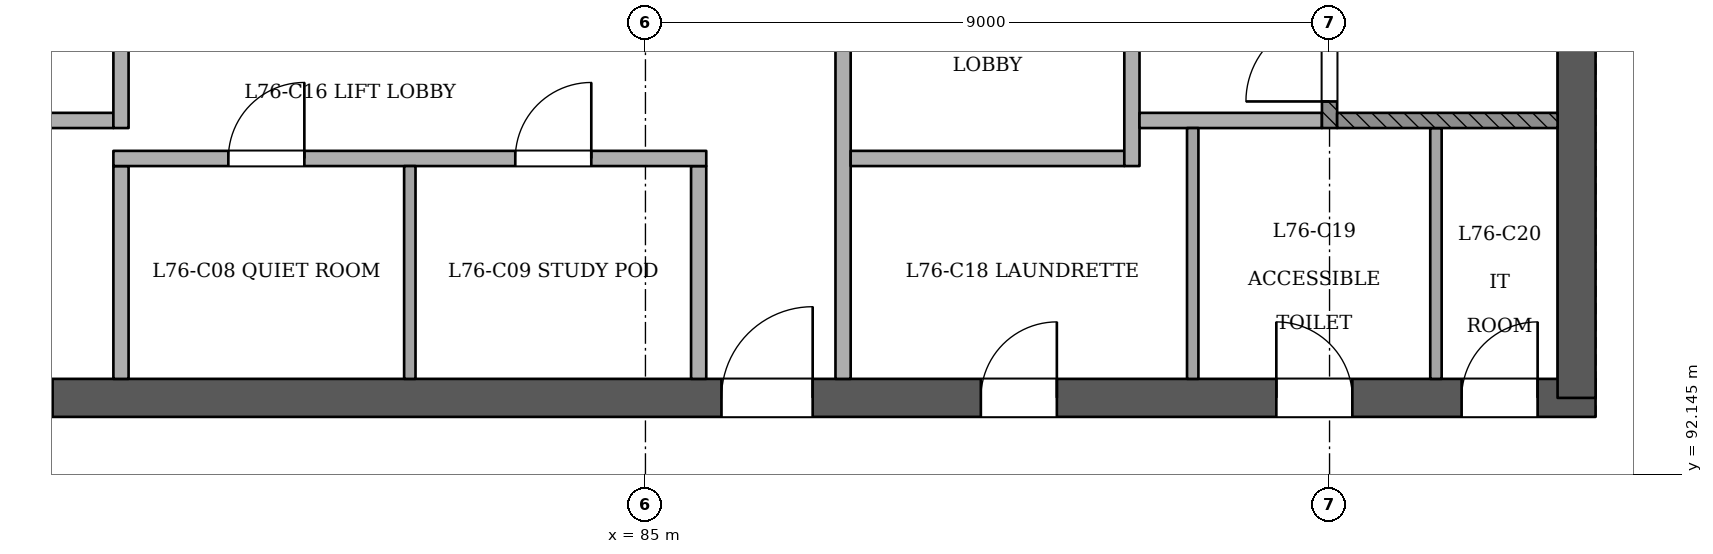
"""IFC4 building model, lengths in metres.
Left out: names, types, materials, properties, quantities, classifications, styles, units other than length and angle.
Written with IfcOpenShell. Run it as: python <this file> out.ifc"""

import sys

from ifc_helpers import new_model, si_unit, direction, frame, frame_2d, origin, place, context, subcontext, project, spatial, rectangle, extrude, element, fill, save


model = new_model("IFC4")
c1 = context("Model", 3, precision=1e-05, world=origin(), true_north=direction((0.0, 1.0)))
c2 = subcontext(c1, "Body", "Model", "MODEL_VIEW")
j1 = project(units=[si_unit("LENGTHUNIT", "METRE"), si_unit("PLANEANGLEUNIT", "RADIAN")], contexts=[c1])
p1 = place(None, origin())
s1 = spatial("IfcSite", under=j1, at=p1, CompositionType="ELEMENT")
p2 = place(p1, origin())
s2 = spatial("IfcBuilding", under=s1, at=p2, CompositionType="ELEMENT")
p3 = place(p2, frame((0.0, 0.0, 295.0)))
s3 = spatial("IfcBuildingStorey", under=s2, at=p3, CompositionType="ELEMENT", Elevation=295.0)
p4 = place(p3, frame((72.75, 93.15, 0.0), z_axis=(0.0, 0.0, 1.0), x_axis=(1.0, 0.0, 0.0)))
e1 = element("IfcWall", 1, at=p4, inside=s3, PredefinedType="SHEAR", context=c2, shape_type="SweptSolid", body=[
    extrude(rectangle(XDim=24.75, YDim=0.5, at=frame_2d((12.375, 0.0))), origin(), (0.0, 0.0, 1.0), 3.6),
])
p5 = place(p4, frame((1.05, 0.0, 0.0)))
e2 = element("IfcOpeningElement", 2, at=p5, cuts=e1, PredefinedType="OPENING", context=c2, shape_type="SweptSolid", body=[
    extrude(rectangle(XDim=1.2, YDim=2.1, at=frame_2d((0.6, 1.05))), frame((0.0, 0.26, 0.0), z_axis=(0.0, -1.0, 0.0), x_axis=(1.0, 0.0, 0.0)), (0.0, 0.0, 1.0), 0.521),
])
p6 = place(p4, frame((3.25, 0.0, 0.0)))
e3 = element("IfcOpeningElement", 3, at=p6, cuts=e1, PredefinedType="OPENING", context=c2, shape_type="SweptSolid", body=[
    extrude(rectangle(XDim=1.2, YDim=2.1, at=frame_2d((0.6, 1.05))), frame((0.0, 0.26, 0.0), z_axis=(0.0, -1.0, 0.0), x_axis=(1.0, 0.0, 0.0)), (0.0, 0.0, 1.0), 0.521),
])
p7 = place(p4, frame((13.25, 0.0, 0.0)))
e4 = element("IfcOpeningElement", 4, at=p7, cuts=e1, PredefinedType="OPENING", context=c2, shape_type="SweptSolid", body=[
    extrude(rectangle(XDim=1.2, YDim=2.1, at=frame_2d((0.6, 1.05))), frame((0.0, 0.26, 0.0), z_axis=(0.0, -1.0, 0.0), x_axis=(1.0, 0.0, 0.0)), (0.0, 0.0, 1.0), 0.521),
])
p8 = place(p4, frame((16.663, 0.0, 0.0)))
e5 = element("IfcOpeningElement", 5, at=p8, cuts=e1, PredefinedType="OPENING", context=c2, shape_type="SweptSolid", body=[
    extrude(rectangle(XDim=1.0, YDim=2.1, at=frame_2d((0.5, 1.05))), frame((0.0, 0.26, 0.0), z_axis=(0.0, -1.0, 0.0), x_axis=(1.0, 0.0, 0.0)), (0.0, 0.0, 1.0), 0.521),
])
p9 = place(p4, frame((20.55, 0.0, 0.0)))
e6 = element("IfcOpeningElement", 6, at=p9, cuts=e1, PredefinedType="OPENING", context=c2, shape_type="SweptSolid", body=[
    extrude(rectangle(XDim=1.0, YDim=2.1, at=frame_2d((0.5, 1.05))), frame((0.0, 0.26, 0.0), z_axis=(0.0, -1.0, 0.0), x_axis=(1.0, 0.0, 0.0)), (0.0, 0.0, 1.0), 0.521),
])
p10 = place(p4, frame((22.988, 0.0, 0.0)))
e7 = element("IfcOpeningElement", 7, at=p10, cuts=e1, PredefinedType="OPENING", context=c2, shape_type="SweptSolid", body=[
    extrude(rectangle(XDim=1.0, YDim=2.1, at=frame_2d((0.5, 1.05))), frame((0.0, 0.26, 0.0), z_axis=(0.0, -1.0, 0.0), x_axis=(1.0, 0.0, 0.0)), (0.0, 0.0, 1.0), 0.521),
])
p11 = place(p3, frame((97.25, 93.15, 0.0), z_axis=(0.0, 0.0, 1.0), x_axis=(0.0, 1.0, 0.0)))
e8 = element("IfcWall", 8, at=p11, inside=s3, PredefinedType="SHEAR", context=c2, shape_type="SweptSolid", body=[
    extrude(rectangle(XDim=10.75, YDim=0.5, at=frame_2d((5.375, 0.0))), origin(), (0.0, 0.0, 1.0), 3.6),
])
p12 = place(p3, frame((78.1, 93.4, 0.0), z_axis=(0.0, 0.0, 1.0), x_axis=(0.0, 1.0, 0.0)))
e9 = element("IfcWall", 9, at=p12, inside=s3, PredefinedType="PARTITIONING", context=c2, shape_type="SweptSolid", body=[
    extrude(rectangle(XDim=2.8, YDim=0.2, at=frame_2d((1.4, 0.0))), origin(), (0.0, 0.0, 1.0), 3.2),
])
p13 = place(p3, frame((81.9, 93.4, 0.0), z_axis=(0.0, 0.0, 1.0), x_axis=(0.0, 1.0, 0.0)))
e10 = element("IfcWall", 10, at=p13, inside=s3, PredefinedType="PARTITIONING", context=c2, shape_type="SweptSolid", body=[
    extrude(rectangle(XDim=2.8, YDim=0.15, at=frame_2d((1.4, 0.0))), origin(), (0.0, 0.0, 1.0), 3.2),
])
p14 = place(p3, frame((85.7, 93.4, 0.0), z_axis=(0.0, 0.0, 1.0), x_axis=(0.0, 1.0, 0.0)))
e11 = element("IfcWall", 11, at=p14, inside=s3, PredefinedType="PARTITIONING", context=c2, shape_type="SweptSolid", body=[
    extrude(rectangle(XDim=2.8, YDim=0.2, at=frame_2d((1.4, 0.0))), origin(), (0.0, 0.0, 1.0), 3.2),
])
p15 = place(p3, frame((87.6, 93.4, 0.0), z_axis=(0.0, 0.0, 1.0), x_axis=(0.0, 1.0, 0.0)))
e12 = element("IfcWall", 12, at=p15, inside=s3, PredefinedType="PARTITIONING", context=c2, shape_type="SweptSolid", body=[
    extrude(rectangle(XDim=7.0, YDim=0.2, at=frame_2d((3.5, 0.0))), origin(), (0.0, 0.0, 1.0), 3.2),
])
p16 = place(p15, frame((4.45, 0.0, 0.0)))
e13 = element("IfcOpeningElement", 13, at=p16, cuts=e12, PredefinedType="OPENING", context=c2, shape_type="SweptSolid", body=[
    extrude(rectangle(XDim=1.1, YDim=2.1, at=frame_2d((0.55, 1.05))), frame((0.0, 0.11, 0.0), z_axis=(0.0, -1.0, 0.0), x_axis=(1.0, 0.0, 0.0)), (0.0, 0.0, 1.0), 0.221),
])
for number, where, z_axis, x_axis in (
    (14, (92.2, 93.4, 0.0), (0.0, 0.0, 1.0), (0.0, 1.0, 0.0)),
    (15, (95.4, 93.4, 0.0), (0.0, 0.0, 1.0), (0.0, 1.0, 0.0)),
):
    element("IfcWall", number, at=place(p3, frame(where, z_axis=z_axis, x_axis=x_axis)), inside=s3, PredefinedType="PARTITIONING", context=c2, shape_type="SweptSolid", body=[
        extrude(rectangle(XDim=3.3, YDim=0.15, at=frame_2d((1.65, 0.0))), origin(), (0.0, 0.0, 1.0), 3.2),
    ])
p17 = place(p3, frame((78.0, 96.3, 0.0), z_axis=(0.0, 0.0, 1.0), x_axis=(1.0, 0.0, 0.0)))
e16 = element("IfcWall", 16, at=p17, inside=s3, PredefinedType="PARTITIONING", context=c2, shape_type="SweptSolid", body=[
    extrude(rectangle(XDim=7.8, YDim=0.2, at=frame_2d((3.9, 0.0))), origin(), (0.0, 0.0, 1.0), 3.2),
])
p18 = place(p17, frame((1.512, 0.0, 0.0)))
e17 = element("IfcOpeningElement", 17, at=p18, cuts=e16, PredefinedType="OPENING", context=c2, shape_type="SweptSolid", body=[
    extrude(rectangle(XDim=1.0, YDim=2.1, at=frame_2d((0.5, 1.05))), frame((0.0, 0.11, 0.0), z_axis=(0.0, -1.0, 0.0), x_axis=(1.0, 0.0, 0.0)), (0.0, 0.0, 1.0), 0.221),
])
p19 = place(p17, frame((5.288, 0.0, 0.0)))
e18 = element("IfcOpeningElement", 18, at=p19, cuts=e16, PredefinedType="OPENING", context=c2, shape_type="SweptSolid", body=[
    extrude(rectangle(XDim=1.0, YDim=2.1, at=frame_2d((0.5, 1.05))), frame((0.0, 0.11, 0.0), z_axis=(0.0, -1.0, 0.0), x_axis=(1.0, 0.0, 0.0)), (0.0, 0.0, 1.0), 0.221),
])
p20 = place(p3, frame((87.7, 96.3, 0.0), z_axis=(0.0, 0.0, 1.0), x_axis=(1.0, 0.0, 0.0)))
e19 = element("IfcWall", 19, at=p20, inside=s3, PredefinedType="PARTITIONING", context=c2, shape_type="SweptSolid", body=[
    extrude(rectangle(XDim=3.6, YDim=0.2, at=frame_2d((1.8, 0.0))), origin(), (0.0, 0.0, 1.0), 3.2),
])
p21 = place(p3, frame((91.4, 96.2, 0.0), z_axis=(0.0, 0.0, 1.0), x_axis=(0.0, 1.0, 0.0)))
e20 = element("IfcWall", 20, at=p21, inside=s3, PredefinedType="PARTITIONING", context=c2, shape_type="SweptSolid", body=[
    extrude(rectangle(XDim=4.2, YDim=0.2, at=frame_2d((2.1, 0.0))), origin(), (0.0, 0.0, 1.0), 3.2),
])
p22 = place(p21, frame((2.45, 0.0, 0.0)))
e21 = element("IfcOpeningElement", 21, at=p22, cuts=e20, PredefinedType="OPENING", context=c2, shape_type="SweptSolid", body=[
    extrude(rectangle(XDim=1.1, YDim=2.1, at=frame_2d((0.55, 1.05))), frame((0.0, 0.11, 0.0), z_axis=(0.0, -1.0, 0.0), x_axis=(1.0, 0.0, 0.0)), (0.0, 0.0, 1.0), 0.221),
])
p23 = place(p3, frame((76.1, 96.8, 0.0), z_axis=(0.0, 0.0, 1.0), x_axis=(1.0, 0.0, 0.0)))
e22 = element("IfcWall", 22, at=p23, inside=s3, PredefinedType="PARTITIONING", context=c2, shape_type="SweptSolid", body=[
    extrude(rectangle(XDim=1.9, YDim=0.2, at=frame_2d((0.95, 0.0))), origin(), (0.0, 0.0, 1.0), 3.2),
])
p24 = place(p3, frame((78.1, 96.7, 0.0), z_axis=(0.0, 0.0, 1.0), x_axis=(0.0, 1.0, 0.0)))
e23 = element("IfcWall", 23, at=p24, inside=s3, PredefinedType="PARTITIONING", context=c2, shape_type="SweptSolid", body=[
    extrude(rectangle(XDim=3.7, YDim=0.2, at=frame_2d((1.85, 0.0))), origin(), (0.0, 0.0, 1.0), 3.2),
])
p25 = place(p24, frame((1.95, 0.0, 0.0)))
e24 = element("IfcOpeningElement", 24, at=p25, cuts=e23, PredefinedType="OPENING", context=c2, shape_type="SweptSolid", body=[
    extrude(rectangle(XDim=1.1, YDim=2.1, at=frame_2d((0.55, 1.05))), frame((0.0, 0.11, 0.0), z_axis=(0.0, -1.0, 0.0), x_axis=(1.0, 0.0, 0.0)), (0.0, 0.0, 1.0), 0.221),
])
p26 = place(p3, frame((91.5, 96.8, 0.0), z_axis=(0.0, 0.0, 1.0), x_axis=(1.0, 0.0, 0.0)))
e25 = element("IfcWall", 25, at=p26, inside=s3, PredefinedType="PARTITIONING", context=c2, shape_type="SweptSolid", body=[
    extrude(rectangle(XDim=2.4, YDim=0.2, at=frame_2d((1.2, 0.0))), origin(), (0.0, 0.0, 1.0), 3.2),
])
p27 = place(p3, frame((94.0, 96.7, 0.0), z_axis=(0.0, 0.0, 1.0), x_axis=(0.0, 1.0, 0.0)))
e26 = element("IfcWall", 26, at=p27, inside=s3, PredefinedType="SOLIDWALL", context=c2, shape_type="SweptSolid", body=[
    extrude(rectangle(XDim=3.7, YDim=0.2, at=frame_2d((1.85, 0.0))), origin(), (0.0, 0.0, 1.0), 3.2),
])
p28 = place(p27, frame((0.35, 0.0, 0.0)))
e27 = element("IfcOpeningElement", 27, at=p28, cuts=e26, PredefinedType="OPENING", context=c2, shape_type="SweptSolid", body=[
    extrude(rectangle(XDim=1.1, YDim=2.1, at=frame_2d((0.55, 1.05))), frame((0.0, 0.11, 0.0), z_axis=(0.0, -1.0, 0.0), x_axis=(1.0, 0.0, 0.0)), (0.0, 0.0, 1.0), 0.221),
])
p29 = place(p3, frame((94.1, 96.8, 0.0), z_axis=(0.0, 0.0, 1.0), x_axis=(1.0, 0.0, 0.0)))
e28 = element("IfcWall", 28, at=p29, inside=s3, PredefinedType="SOLIDWALL", context=c2, shape_type="SweptSolid", body=[
    extrude(rectangle(XDim=2.9, YDim=0.2, at=frame_2d((1.45, 0.0))), origin(), (0.0, 0.0, 1.0), 3.2),
])
p30 = place(p28, origin())
e29 = element("IfcDoor", 29, at=p30, inside=s3, OperationType="SINGLE_SWING_LEFT", PredefinedType="NOTDEFINED", context=c2, shape_type="SweptSolid", body=[
    extrude(rectangle(XDim=1.1, YDim=2.1, at=frame_2d((0.55, 1.05))), frame((0.0, 0.025, 0.0), z_axis=(0.0, -1.0, 0.0), x_axis=(1.0, 0.0, 0.0)), (0.0, 0.0, 1.0), 0.05),
])
fill(e27, e29)
p31 = place(p6, origin())
e30 = element("IfcDoor", 30, at=p31, inside=s3, OperationType="SINGLE_SWING_LEFT", PredefinedType="NOTDEFINED", context=c2, shape_type="SweptSolid", body=[
    extrude(rectangle(XDim=1.2, YDim=2.1, at=frame_2d((0.6, 1.05))), frame((0.0, 0.025, 0.0), z_axis=(0.0, -1.0, 0.0), x_axis=(1.0, 0.0, 0.0)), (0.0, 0.0, 1.0), 0.05),
])
fill(e3, e30)
p32 = place(p7, origin())
e31 = element("IfcDoor", 31, at=p32, inside=s3, OperationType="SINGLE_SWING_RIGHT", PredefinedType="NOTDEFINED", context=c2, shape_type="SweptSolid", body=[
    extrude(rectangle(XDim=1.2, YDim=2.1, at=frame_2d((0.6, 1.05))), frame((0.0, 0.025, 0.0), z_axis=(0.0, -1.0, 0.0), x_axis=(1.0, 0.0, 0.0)), (0.0, 0.0, 1.0), 0.05),
])
fill(e4, e31)
p33 = place(p8, origin())
e32 = element("IfcDoor", 32, at=p33, inside=s3, OperationType="SINGLE_SWING_RIGHT", PredefinedType="NOTDEFINED", context=c2, shape_type="SweptSolid", body=[
    extrude(rectangle(XDim=1.0, YDim=2.1, at=frame_2d((0.5, 1.05))), frame((0.0, 0.025, 0.0), z_axis=(0.0, -1.0, 0.0), x_axis=(1.0, 0.0, 0.0)), (0.0, 0.0, 1.0), 0.05),
])
fill(e5, e32)
p34 = place(p9, origin())
e33 = element("IfcDoor", 33, at=p34, inside=s3, OperationType="SINGLE_SWING_LEFT", PredefinedType="NOTDEFINED", context=c2, shape_type="SweptSolid", body=[
    extrude(rectangle(XDim=1.0, YDim=2.1, at=frame_2d((0.5, 1.05))), frame((0.0, 0.025, 0.0), z_axis=(0.0, -1.0, 0.0), x_axis=(1.0, 0.0, 0.0)), (0.0, 0.0, 1.0), 0.05),
])
fill(e6, e33)
p35 = place(p10, origin())
e34 = element("IfcDoor", 34, at=p35, inside=s3, OperationType="SINGLE_SWING_RIGHT", PredefinedType="NOTDEFINED", context=c2, shape_type="SweptSolid", body=[
    extrude(rectangle(XDim=1.0, YDim=2.1, at=frame_2d((0.5, 1.05))), frame((0.0, 0.025, 0.0), z_axis=(0.0, -1.0, 0.0), x_axis=(1.0, 0.0, 0.0)), (0.0, 0.0, 1.0), 0.05),
])
fill(e7, e34)
p36 = place(p18, origin())
e35 = element("IfcDoor", 35, at=p36, inside=s3, OperationType="SINGLE_SWING_RIGHT", PredefinedType="NOTDEFINED", context=c2, shape_type="SweptSolid", body=[
    extrude(rectangle(XDim=1.0, YDim=2.1, at=frame_2d((0.5, 1.05))), frame((0.0, 0.025, 0.0), z_axis=(0.0, -1.0, 0.0), x_axis=(1.0, 0.0, 0.0)), (0.0, 0.0, 1.0), 0.05),
])
fill(e17, e35)
p37 = place(p19, origin())
e36 = element("IfcDoor", 36, at=p37, inside=s3, OperationType="SINGLE_SWING_RIGHT", PredefinedType="NOTDEFINED", context=c2, shape_type="SweptSolid", body=[
    extrude(rectangle(XDim=1.0, YDim=2.1, at=frame_2d((0.5, 1.05))), frame((0.0, 0.025, 0.0), z_axis=(0.0, -1.0, 0.0), x_axis=(1.0, 0.0, 0.0)), (0.0, 0.0, 1.0), 0.05),
])
fill(e18, e36)
save(model, sys.argv[1])
